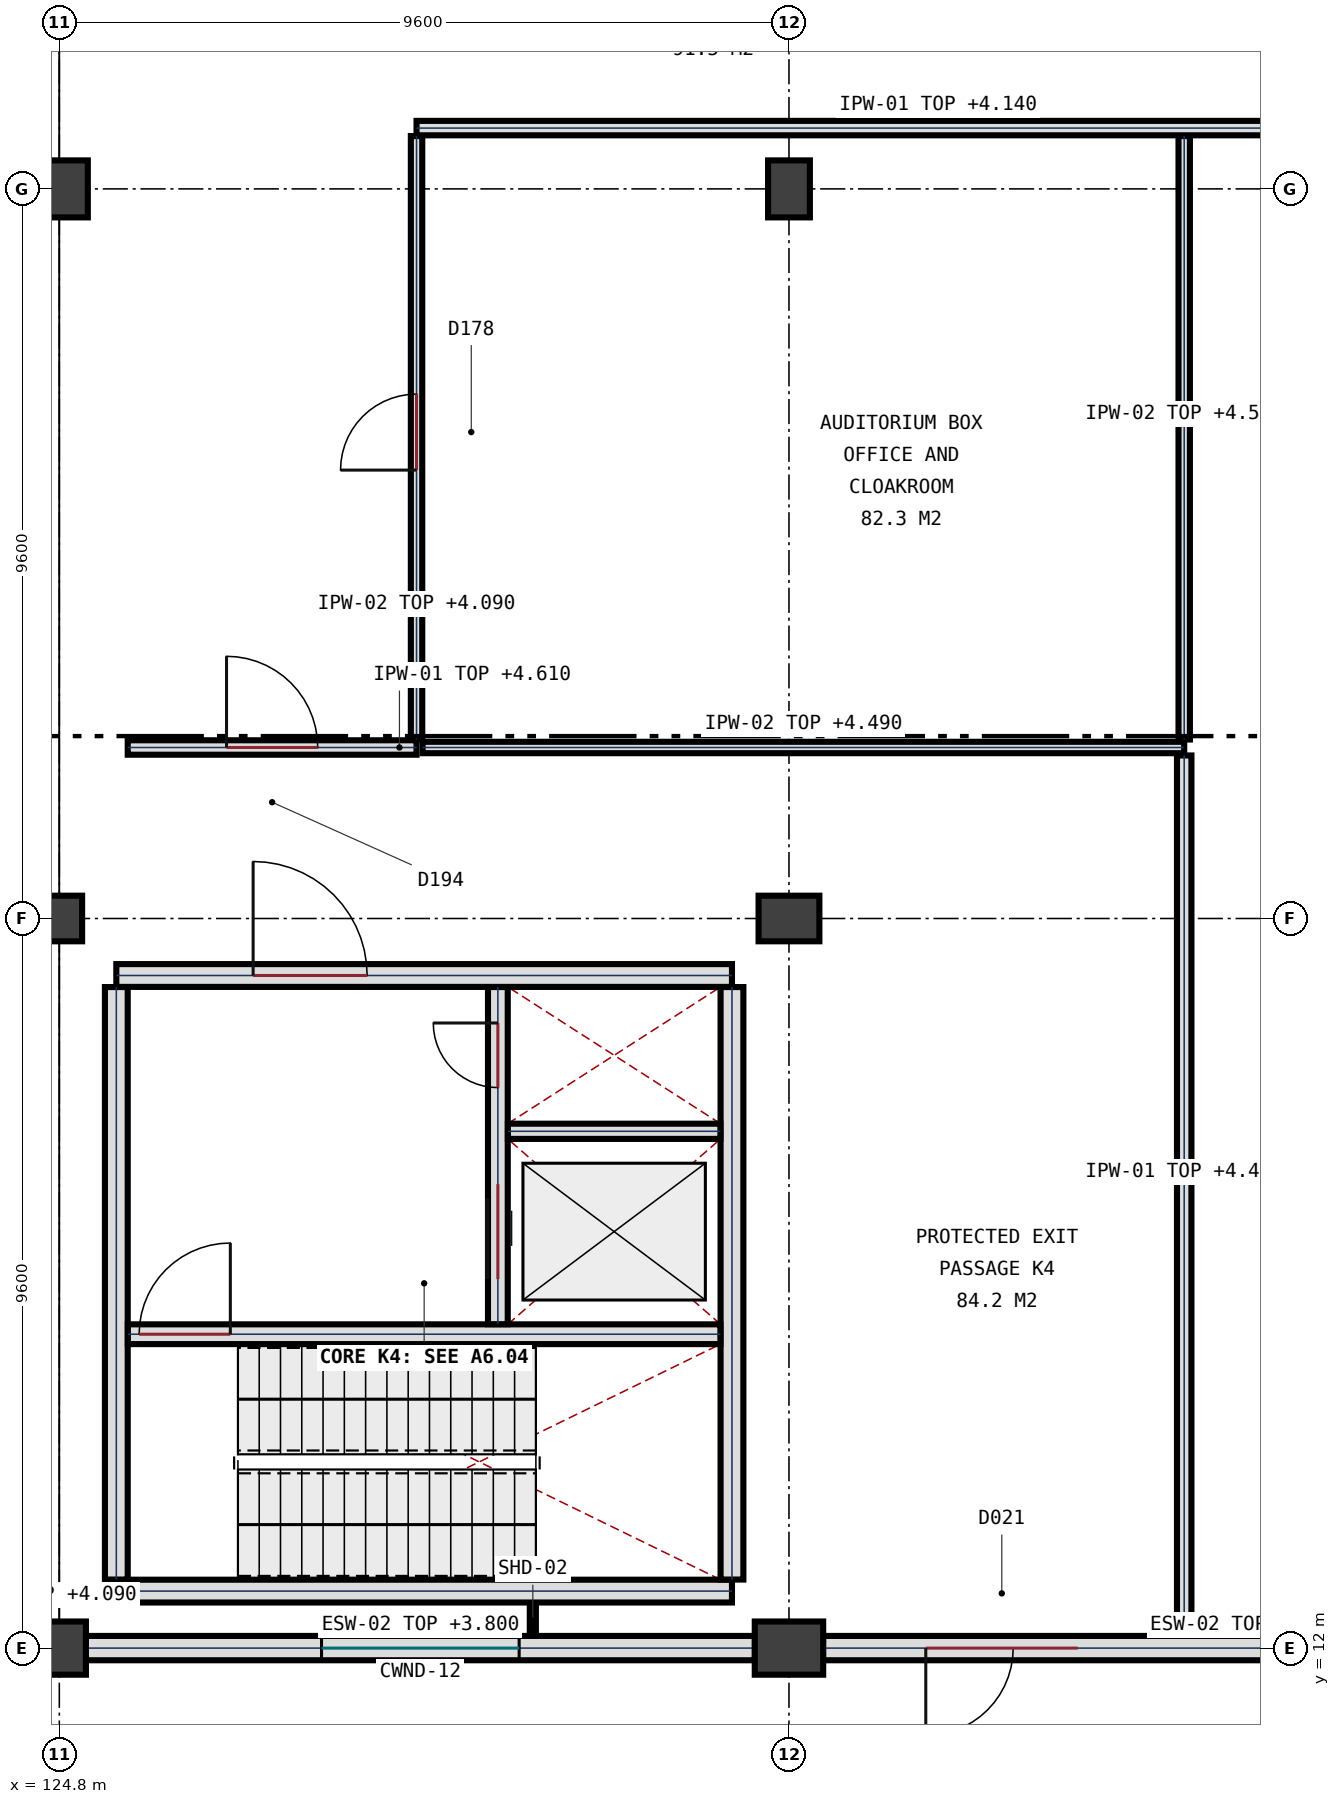
"""IFC4 building model, lengths in metres.
Left out: names, types, materials, properties, quantities, classifications, styles, units other than length and angle.
Written with IfcOpenShell. Run it as: python <this file> out.ifc"""

import sys

from ifc_helpers import new_model, si_unit, direction, frame, frame_2d, origin, origin_2d, place, context, subcontext, project, spatial, rectangle, circle, extrude, element, fill, save


model = new_model("IFC4")
c1 = context("Model", 3, precision=1e-05, world=origin(), true_north=direction((0.0, 1.0)))
c2 = subcontext(c1, "Body", "Model", "MODEL_VIEW")
j1 = project(units=[si_unit("LENGTHUNIT", "METRE"), si_unit("PLANEANGLEUNIT", "RADIAN")], contexts=[c1])
p1 = place(None, origin())
s1 = spatial("IfcSite", under=j1, at=p1, CompositionType="ELEMENT")
p2 = place(p1, origin())
s2 = spatial("IfcBuilding", under=s1, at=p2, CompositionType="ELEMENT")
p3 = place(p2, origin())
s3 = spatial("IfcBuildingStorey", under=s2, at=p3, CompositionType="ELEMENT", Elevation=0.0)
p4 = place(p3, frame((124.8, 12.0, 0.0), z_axis=(0.0, 0.0, 1.0), x_axis=(1.0, 0.0, 0.0)))
e1 = element("IfcColumn", 1, at=p4, inside=s3, PredefinedType="COLUMN", context=c2, shape_type="SweptSolid", body=[
    extrude(circle(Radius=0.35, at=origin_2d()), origin(), (0.0, 0.0, 1.0), 5.4),
])
p5 = place(p3, frame((124.8, 21.6, 0.0), z_axis=(0.0, 0.0, 1.0), x_axis=(1.0, 0.0, 0.0)))
e2 = element("IfcColumn", 2, at=p5, inside=s3, PredefinedType="COLUMN", context=c2, shape_type="SweptSolid", body=[
    extrude(circle(Radius=0.3, at=origin_2d()), origin(), (0.0, 0.0, 1.0), 5.4),
])
p6 = place(p3, frame((124.8, 31.2, 0.0), z_axis=(0.0, 0.0, 1.0), x_axis=(1.0, 0.0, 0.0)))
e3 = element("IfcColumn", 3, at=p6, inside=s3, PredefinedType="COLUMN", context=c2, shape_type="SweptSolid", body=[
    extrude(rectangle(XDim=0.75, YDim=0.75, at=origin_2d()), origin(), (0.0, 0.0, 1.0), 5.4),
])
p7 = place(p3, frame((134.4, 12.0, 0.0), z_axis=(0.0, 0.0, 1.0), x_axis=(1.0, 0.0, 0.0)))
e4 = element("IfcColumn", 4, at=p7, inside=s3, PredefinedType="COLUMN", context=c2, shape_type="SweptSolid", body=[
    extrude(rectangle(XDim=0.9, YDim=0.7, at=origin_2d()), origin(), (0.0, 0.0, 1.0), 5.4),
])
p8 = place(p3, frame((134.4, 21.6, 0.0), z_axis=(0.0, 0.0, 1.0), x_axis=(1.0, 0.0, 0.0)))
e5 = element("IfcColumn", 5, at=p8, inside=s3, PredefinedType="COLUMN", context=c2, shape_type="SweptSolid", body=[
    extrude(rectangle(XDim=0.8, YDim=0.6, at=origin_2d()), origin(), (0.0, 0.0, 1.0), 5.4),
])
p9 = place(p3, frame((134.4, 31.2, 0.0), z_axis=(0.0, 0.0, 1.0), x_axis=(0.0, 1.0, 0.0)))
e6 = element("IfcColumn", 6, at=p9, inside=s3, PredefinedType="COLUMN", context=c2, shape_type="SweptSolid", body=[
    extrude(rectangle(XDim=0.75, YDim=0.55, at=origin_2d()), origin(), (0.0, 0.0, 1.0), 5.4),
])
p10 = place(p3, frame((146.877, 12.0, 0.0), z_axis=(0.0, 0.0, 1.0), x_axis=(-1.0, 0.0, 0.0)))
e7 = element("IfcWall", 7, at=p10, inside=s3, PredefinedType="SOLIDWALL", context=c2, shape_type="SweptSolid", body=[
    extrude(rectangle(XDim=12.029, YDim=0.32, at=frame_2d((6.015, 0.0))), origin(), (0.0, 0.0, 1.0), 4.35),
])
p11 = place(p10, frame((8.677, 0.0, 0.0)))
e8 = element("IfcOpeningElement", 8, at=p11, cuts=e7, PredefinedType="OPENING", context=c2, shape_type="SweptSolid", body=[
    extrude(rectangle(XDim=2.0, YDim=2.35, at=frame_2d((1.0, 1.175))), frame((0.0, 0.17, 0.0), z_axis=(0.0, -1.0, 0.0), x_axis=(1.0, 0.0, 0.0)), (0.0, 0.0, 1.0), 0.34),
])
p12 = place(p10, frame((1.977, 0.0, 0.0)))
e9 = element("IfcOpeningElement", 9, at=p12, cuts=e7, PredefinedType="OPENING", context=c2, shape_type="SweptSolid", body=[
    extrude(rectangle(XDim=2.2, YDim=2.45, at=frame_2d((1.1, 1.225))), frame((0.0, 0.17, 0.0), z_axis=(0.0, -1.0, 0.0), x_axis=(1.0, 0.0, 0.0)), (0.0, 0.0, 1.0), 0.34),
])
p13 = place(p3, frame((133.952, 12.0, 0.0), z_axis=(0.0, 0.0, 1.0), x_axis=(-1.0, 0.0, 0.0)))
e10 = element("IfcWall", 10, at=p13, inside=s3, PredefinedType="SOLIDWALL", context=c2, shape_type="SweptSolid", body=[
    extrude(rectangle(XDim=8.804, YDim=0.32, at=frame_2d((4.402, 0.0))), origin(), (0.0, 0.0, 1.0), 3.8),
])
p14 = place(p13, frame((3.102, 0.0, 0.95)))
e11 = element("IfcOpeningElement", 11, at=p14, cuts=e10, PredefinedType="OPENING", context=c2, shape_type="SweptSolid", body=[
    extrude(rectangle(XDim=2.6, YDim=1.45, at=frame_2d((1.3, 0.725))), frame((0.0, 0.17, 0.0), z_axis=(0.0, -1.0, 0.0), x_axis=(1.0, 0.0, 0.0)), (0.0, 0.0, 1.0), 0.34),
])
p15 = place(p3, frame((133.65, 12.75, 0.0), z_axis=(0.0, 0.0, 1.0), x_axis=(-1.0, 0.0, 0.0)))
e12 = element("IfcWall", 12, at=p15, inside=s3, PredefinedType="SHEAR", context=c2, shape_type="SweptSolid", body=[
    extrude(rectangle(XDim=8.1, YDim=0.3, at=frame_2d((4.05, 0.0))), origin(), (0.0, 0.0, 1.0), 5.4),
])
p16 = place(p3, frame((125.55, 20.85, 0.0), z_axis=(0.0, 0.0, 1.0), x_axis=(1.0, 0.0, 0.0)))
e13 = element("IfcWall", 13, at=p16, inside=s3, PredefinedType="SHEAR", context=c2, shape_type="SweptSolid", body=[
    extrude(rectangle(XDim=8.1, YDim=0.3, at=frame_2d((4.05, 0.0))), origin(), (0.0, 0.0, 1.0), 5.4),
])
p17 = place(p16, frame((1.8, 0.0, 0.0)))
e14 = element("IfcOpeningElement", 14, at=p17, cuts=e13, PredefinedType="OPENING", context=c2, shape_type="SweptSolid", body=[
    extrude(rectangle(XDim=1.5, YDim=2.25, at=frame_2d((0.75, 1.125))), frame((0.0, 0.16, 0.0), z_axis=(0.0, -1.0, 0.0), x_axis=(1.0, 0.0, 0.0)), (0.0, 0.0, 1.0), 0.32),
])
for number, where, z_axis, x_axis in (
    (15, (125.55, 12.902, 0.0), (0.0, 0.0, 1.0), (0.0, 1.0, 0.0)),
    (16, (133.65, 20.698, 0.0), (0.0, 0.0, 1.0), (0.0, -1.0, 0.0)),
):
    element("IfcWall", number, at=place(p3, frame(where, z_axis=z_axis, x_axis=x_axis)), inside=s3, PredefinedType="SHEAR", context=c2, shape_type="SweptSolid", body=[
        extrude(rectangle(XDim=7.796, YDim=0.3, at=frame_2d((3.898, 0.0))), origin(), (0.0, 0.0, 1.0), 5.4),
    ])
p18 = place(p3, frame((125.702, 16.13, 0.0), z_axis=(0.0, 0.0, 1.0), x_axis=(1.0, 0.0, 0.0)))
e17 = element("IfcWall", 17, at=p18, inside=s3, PredefinedType="SHEAR", context=c2, shape_type="SweptSolid", body=[
    extrude(rectangle(XDim=7.796, YDim=0.26, at=frame_2d((3.898, 0.0))), origin(), (0.0, 0.0, 1.0), 5.4),
])
p19 = place(p18, frame((0.148, 0.0, 0.0)))
e18 = element("IfcOpeningElement", 18, at=p19, cuts=e17, PredefinedType="OPENING", context=c2, shape_type="SweptSolid", body=[
    extrude(rectangle(XDim=1.2, YDim=2.2, at=frame_2d((0.6, 1.1))), frame((0.0, 0.14, 0.0), z_axis=(0.0, -1.0, 0.0), x_axis=(1.0, 0.0, 0.0)), (0.0, 0.0, 1.0), 0.28),
])
p20 = place(p3, frame((130.57, 16.262, 0.0), z_axis=(0.0, 0.0, 1.0), x_axis=(0.0, 1.0, 0.0)))
e19 = element("IfcWall", 19, at=p20, inside=s3, PredefinedType="SHEAR", context=c2, shape_type="SweptSolid", body=[
    extrude(rectangle(XDim=4.436, YDim=0.26, at=frame_2d((2.218, 0.0))), origin(), (0.0, 0.0, 1.0), 5.4),
])
p21 = place(p20, frame((3.113, 0.0, 0.0)))
e20 = element("IfcOpeningElement", 20, at=p21, cuts=e19, PredefinedType="OPENING", context=c2, shape_type="SweptSolid", body=[
    extrude(rectangle(XDim=0.85, YDim=2.05, at=frame_2d((0.425, 1.025))), frame((0.0, 0.14, 0.0), z_axis=(0.0, -1.0, 0.0), x_axis=(1.0, 0.0, 0.0)), (0.0, 0.0, 1.0), 0.28),
])
p22 = place(p20, frame((0.593, 0.0, 0.0)))
e21 = element("IfcOpeningElement", 21, at=p22, cuts=e19, PredefinedType="OPENING", context=c2, shape_type="SweptSolid", body=[
    extrude(rectangle(XDim=1.25, YDim=2.2, at=frame_2d((0.625, 1.1))), frame((0.0, 0.14, 0.0), z_axis=(0.0, -1.0, 0.0), x_axis=(1.0, 0.0, 0.0)), (0.0, 0.0, 1.0), 0.28),
])
p23 = place(p3, frame((130.702, 18.8, 0.0), z_axis=(0.0, 0.0, 1.0), x_axis=(1.0, 0.0, 0.0)))
e22 = element("IfcWall", 22, at=p23, inside=s3, PredefinedType="PLUMBINGWALL", context=c2, shape_type="SweptSolid", body=[
    extrude(rectangle(XDim=2.796, YDim=0.2, at=frame_2d((1.398, 0.0))), origin(), (0.0, 0.0, 1.0), 5.1),
])
p24 = place(p3, frame((125.7, 23.85, 0.0), z_axis=(0.0, 0.0, 1.0), x_axis=(1.0, 0.0, 0.0)))
e23 = element("IfcWall", 23, at=p24, inside=s3, PredefinedType="PARTITIONING", context=c2, shape_type="SweptSolid", body=[
    extrude(rectangle(XDim=3.8, YDim=0.19, at=frame_2d((1.9, 0.0))), origin(), (0.0, 0.0, 1.0), 4.61),
])
p25 = place(p24, frame((1.3, 0.0, 0.0)))
e24 = element("IfcOpeningElement", 24, at=p25, cuts=e23, PredefinedType="OPENING", context=c2, shape_type="SweptSolid", body=[
    extrude(rectangle(XDim=1.2, YDim=2.2, at=frame_2d((0.6, 1.1))), frame((0.0, 0.105, 0.0), z_axis=(0.0, -1.0, 0.0), x_axis=(1.0, 0.0, 0.0)), (0.0, 0.0, 1.0), 0.21),
])
p26 = place(p3, frame((129.5, 32.0, 0.0), z_axis=(0.0, 0.0, 1.0), x_axis=(1.0, 0.0, 0.0)))
e25 = element("IfcWall", 25, at=p26, inside=s3, PredefinedType="PARTITIONING", context=c2, shape_type="SweptSolid", body=[
    extrude(rectangle(XDim=30.5, YDim=0.19, at=frame_2d((15.25, 0.0))), origin(), (0.0, 0.0, 1.0), 4.14),
])
p27 = place(p26, frame((14.575, 0.0, 0.0)))
e26 = element("IfcOpeningElement", 26, at=p27, cuts=e25, PredefinedType="OPENING", context=c2, shape_type="SweptSolid", body=[
    extrude(rectangle(XDim=1.85, YDim=2.35, at=frame_2d((0.925, 1.175))), frame((0.0, 0.105, 0.0), z_axis=(0.0, -1.0, 0.0), x_axis=(1.0, 0.0, 0.0)), (0.0, 0.0, 1.0), 0.21),
])
p28 = place(p3, frame((129.58, 23.85, 0.0), z_axis=(0.0, 0.0, 1.0), x_axis=(1.0, 0.0, 0.0)))
e27 = element("IfcWall", 27, at=p28, inside=s3, PredefinedType="PARTITIONING", context=c2, shape_type="SweptSolid", body=[
    extrude(rectangle(XDim=10.02, YDim=0.15, at=frame_2d((5.01, 0.0))), origin(), (0.0, 0.0, 1.0), 4.49),
])
p29 = place(p3, frame((129.5, 23.955, 0.0), z_axis=(0.0, 0.0, 1.0), x_axis=(0.0, 1.0, 0.0)))
e28 = element("IfcWall", 28, at=p29, inside=s3, PredefinedType="PARTITIONING", context=c2, shape_type="SweptSolid", body=[
    extrude(rectangle(XDim=7.94, YDim=0.15, at=frame_2d((3.97, 0.0))), origin(), (0.0, 0.0, 1.0), 4.09),
])
p30 = place(p29, frame((3.545, 0.0, 0.0)))
e29 = element("IfcOpeningElement", 29, at=p30, cuts=e28, PredefinedType="OPENING", context=c2, shape_type="SweptSolid", body=[
    extrude(rectangle(XDim=1.0, YDim=2.2, at=frame_2d((0.5, 1.1))), frame((0.0, 0.085, 0.0), z_axis=(0.0, -1.0, 0.0), x_axis=(1.0, 0.0, 0.0)), (0.0, 0.0, 1.0), 0.17),
])
p31 = place(p3, frame((139.6, 12.163, 0.0), z_axis=(0.0, 0.0, 1.0), x_axis=(0.0, 1.0, 0.0)))
e30 = element("IfcWall", 30, at=p31, inside=s3, PredefinedType="PARTITIONING", context=c2, shape_type="SweptSolid", body=[
    extrude(rectangle(XDim=11.582, YDim=0.19, at=frame_2d((5.791, 0.0))), origin(), (0.0, 0.0, 1.0), 4.44),
])
p32 = place(p3, frame((139.6, 23.955, 0.0), z_axis=(0.0, 0.0, 1.0), x_axis=(0.0, 1.0, 0.0)))
e31 = element("IfcWall", 31, at=p32, inside=s3, PredefinedType="PARTITIONING", context=c2, shape_type="SweptSolid", body=[
    extrude(rectangle(XDim=7.94, YDim=0.15, at=frame_2d((3.97, 0.0))), origin(), (0.0, 0.0, 1.0), 4.54),
])
p33 = place(p11, origin())
e32 = element("IfcDoor", 32, at=p33, inside=s3, OperationType="SINGLE_SWING_RIGHT", PredefinedType="DOOR", context=c2, shape_type="SweptSolid", body=[
    extrude(rectangle(XDim=2.0, YDim=2.35, at=frame_2d((1.0, 1.175))), frame((0.0, 0.032, 0.0), z_axis=(0.0, -1.0, 0.0), x_axis=(1.0, 0.0, 0.0)), (0.0, 0.0, 1.0), 0.065),
])
fill(e8, e32)
p34 = place(p14, origin())
e33 = element("IfcWindow", 33, at=p34, inside=s3, PartitioningType="SINGLE_PANEL", PredefinedType="WINDOW", context=c2, shape_type="SweptSolid", body=[
    extrude(rectangle(XDim=2.6, YDim=1.45, at=frame_2d((1.3, 0.725))), frame((0.0, 0.032, 0.0), z_axis=(0.0, -1.0, 0.0), x_axis=(1.0, 0.0, 0.0)), (0.0, 0.0, 1.0), 0.065),
])
fill(e11, e33)
p35 = place(p17, origin())
e34 = element("IfcDoor", 34, at=p35, inside=s3, OperationType="SINGLE_SWING_LEFT", PredefinedType="DOOR", context=c2, shape_type="SweptSolid", body=[
    extrude(rectangle(XDim=1.5, YDim=2.25, at=frame_2d((0.75, 1.125))), frame((0.0, 0.032, 0.0), z_axis=(0.0, -1.0, 0.0), x_axis=(1.0, 0.0, 0.0)), (0.0, 0.0, 1.0), 0.065),
])
fill(e14, e34)
p36 = place(p19, origin())
e35 = element("IfcDoor", 35, at=p36, inside=s3, OperationType="SINGLE_SWING_RIGHT", PredefinedType="DOOR", context=c2, shape_type="SweptSolid", body=[
    extrude(rectangle(XDim=1.2, YDim=2.2, at=frame_2d((0.6, 1.1))), frame((0.0, 0.032, 0.0), z_axis=(0.0, -1.0, 0.0), x_axis=(1.0, 0.0, 0.0)), (0.0, 0.0, 1.0), 0.065),
])
fill(e18, e35)
p37 = place(p21, origin())
e36 = element("IfcDoor", 36, at=p37, inside=s3, OperationType="SINGLE_SWING_RIGHT", PredefinedType="DOOR", context=c2, shape_type="SweptSolid", body=[
    extrude(rectangle(XDim=0.85, YDim=2.05, at=frame_2d((0.425, 1.025))), frame((0.0, 0.032, 0.0), z_axis=(0.0, -1.0, 0.0), x_axis=(1.0, 0.0, 0.0)), (0.0, 0.0, 1.0), 0.065),
])
fill(e20, e36)
p38 = place(p22, origin())
e37 = element("IfcDoor", 37, at=p38, inside=s3, OperationType="SLIDING_TO_LEFT", PredefinedType="DOOR", context=c2, shape_type="SweptSolid", body=[
    extrude(rectangle(XDim=1.25, YDim=2.2, at=frame_2d((0.625, 1.1))), frame((0.0, 0.032, 0.0), z_axis=(0.0, -1.0, 0.0), x_axis=(1.0, 0.0, 0.0)), (0.0, 0.0, 1.0), 0.065),
])
fill(e21, e37)
p39 = place(p30, origin())
e38 = element("IfcDoor", 38, at=p39, inside=s3, OperationType="SINGLE_SWING_LEFT", PredefinedType="DOOR", context=c2, shape_type="SweptSolid", body=[
    extrude(rectangle(XDim=1.0, YDim=2.2, at=frame_2d((0.5, 1.1))), frame((0.0, 0.032, 0.0), z_axis=(0.0, -1.0, 0.0), x_axis=(1.0, 0.0, 0.0)), (0.0, 0.0, 1.0), 0.065),
])
fill(e29, e38)
p40 = place(p25, origin())
e39 = element("IfcDoor", 39, at=p40, inside=s3, OperationType="SINGLE_SWING_LEFT", PredefinedType="DOOR", context=c2, shape_type="SweptSolid", body=[
    extrude(rectangle(XDim=1.2, YDim=2.2, at=frame_2d((0.6, 1.1))), frame((0.0, 0.032, 0.0), z_axis=(0.0, -1.0, 0.0), x_axis=(1.0, 0.0, 0.0)), (0.0, 0.0, 1.0), 0.065),
])
fill(e24, e39)
save(model, sys.argv[1])
